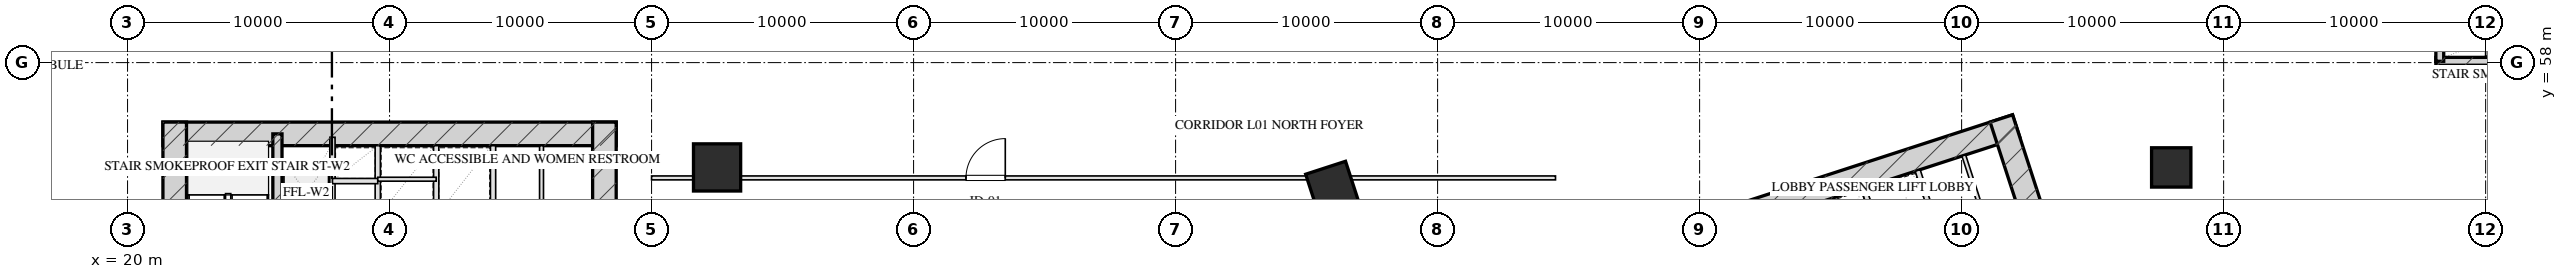
"""IFC4 building model, lengths in metres.
Left out: names, types, materials, properties, quantities, classifications, styles, units other than length and angle.
Written with IfcOpenShell. Run it as: python <this file> out.ifc"""

import sys

from ifc_helpers import new_model, si_unit, direction, frame, frame_2d, origin, origin_2d, place, context, subcontext, project, spatial, rectangle, hollow_rectangle, extrude, element, fill, save


model = new_model("IFC4")
c1 = context("Model", 3, precision=1e-05, world=origin(), true_north=direction((0.0, 1.0)))
c2 = subcontext(c1, "Body", "Model", "MODEL_VIEW")
j1 = project(units=[si_unit("LENGTHUNIT", "METRE"), si_unit("PLANEANGLEUNIT", "RADIAN")], contexts=[c1])
p1 = place(None, origin())
s1 = spatial("IfcSite", under=j1, at=p1, CompositionType="ELEMENT")
p2 = place(p1, origin())
s2 = spatial("IfcBuilding", under=s1, at=p2, CompositionType="ELEMENT")
p3 = place(p2, frame((0.0, 0.0, 6.0)))
s3 = spatial("IfcBuildingStorey", under=s2, at=p3, CompositionType="ELEMENT", Elevation=6.0)
p4 = place(p3, frame((21.35, 55.28, 0.0), z_axis=(0.0, 0.0, 1.0), x_axis=(1.0, 0.0, 0.0)))
e1 = element("IfcWall", 1, at=p4, inside=s3, PredefinedType="SHEAR", context=c2, shape_type="SweptSolid", body=[
    extrude(rectangle(XDim=17.3, YDim=0.9, at=frame_2d((8.65, 0.0))), origin(), (0.0, 0.0, 1.0), 5.5),
])
for number, where, z_axis, x_axis in (
    (2, (21.8, 45.95, 0.0), (0.0, 0.0, 1.0), (0.0, 1.0, 0.0)),
    (3, (38.2, 45.95, 0.0), (0.0, 0.0, 1.0), (0.0, 1.0, 0.0)),
):
    element("IfcWall", number, at=place(p3, frame(where, z_axis=z_axis, x_axis=x_axis)), inside=s3, PredefinedType="SHEAR", context=c2, shape_type="SweptSolid", body=[
        extrude(rectangle(XDim=9.78, YDim=0.9, at=frame_2d((4.89, 0.0))), origin(), (0.0, 0.0, 1.0), 5.5),
    ])
p5 = place(p3, frame((25.72, 48.3, 0.0), z_axis=(0.0, 0.0, 1.0), x_axis=(0.0, 1.0, 0.0)))
e4 = element("IfcWall", 4, at=p5, inside=s3, PredefinedType="SHEAR", context=c2, shape_type="SweptSolid", body=[
    extrude(rectangle(XDim=6.98, YDim=0.35, at=frame_2d((3.49, 0.0))), origin(), (0.0, 0.0, 1.0), 5.5),
])
p6 = place(p3, frame((76.201, 50.419, 0.0), z_axis=(0.0, 0.0, 1.0), x_axis=(0.951056412142, 0.309017314926, 0.0)))
e5 = element("IfcWall", 5, at=p6, inside=s3, PredefinedType="SHEAR", context=c2, shape_type="SweptSolid", body=[
    extrude(rectangle(XDim=16.7, YDim=0.9, at=frame_2d((8.35, 0.0))), origin(), (0.0, 0.0, 1.0), 5.5),
])
p7 = place(p3, frame((94.539, 46.568, 0.0), z_axis=(0.0, 0.0, 1.0), x_axis=(-0.309021722829, 0.951054979914, 0.0)))
e6 = element("IfcWall", 6, at=p7, inside=s3, PredefinedType="SHEAR", context=c2, shape_type="SweptSolid", body=[
    extrude(rectangle(XDim=9.78, YDim=0.9, at=frame_2d((4.89, 0.0))), origin(), (0.0, 0.0, 1.0), 5.5),
])
p8 = place(p3, frame((108.1, 58.05, 0.0), z_axis=(0.0, 0.0, 1.0), x_axis=(1.0, 0.0, 0.0)))
e7 = element("IfcWall", 7, at=p8, inside=s3, PredefinedType="SHEAR", context=c2, shape_type="SweptSolid", body=[
    extrude(rectangle(XDim=8.9, YDim=0.3, at=frame_2d((4.45, 0.0))), origin(), (0.0, 0.0, 1.0), 5.5),
])
p9 = place(p3, frame((108.25, 58.05, 0.0), z_axis=(0.0, 0.0, 1.0), x_axis=(0.0, 1.0, 0.0)))
e8 = element("IfcWall", 8, at=p9, inside=s3, PredefinedType="SHEAR", context=c2, shape_type="SweptSolid", body=[
    extrude(rectangle(XDim=3.4, YDim=0.3, at=frame_2d((1.7, 0.0))), origin(), (0.0, 0.0, 1.0), 5.5),
])
p10 = place(p9, frame((0.65, 0.0, 0.0)))
e9 = element("IfcOpeningElement", 9, at=p10, cuts=e8, PredefinedType="OPENING", context=c2, shape_type="SweptSolid", body=[
    extrude(rectangle(XDim=1.2, YDim=2.05, at=frame_2d((0.6, 1.025))), frame((0.0, 0.16, 0.0), z_axis=(0.0, -1.0, 0.0), x_axis=(1.0, 0.0, 0.0)), (0.0, 0.0, 1.0), 0.32),
])
p11 = place(p3, frame((42.5, 54.0, 0.0), z_axis=(0.0, 0.0, 1.0), x_axis=(1.0, 0.0, 0.0)))
e10 = element("IfcColumn", 10, at=p11, inside=s3, PredefinedType="COLUMN", context=c2, shape_type="SweptSolid", body=[
    extrude(hollow_rectangle(XDim=1.8, YDim=1.8, WallThickness=0.06, at=origin_2d()), origin(), (0.0, 0.0, 1.0), 5.501),
])
p12 = place(p3, frame((98.0, 54.0, 0.0), z_axis=(0.0, 0.0, 1.0), x_axis=(1.0, 0.0, 0.0)))
e11 = element("IfcColumn", 11, at=p12, inside=s3, PredefinedType="COLUMN", context=c2, shape_type="SweptSolid", body=[
    extrude(rectangle(XDim=1.5, YDim=1.5, at=origin_2d()), origin(), (0.0, 0.0, 1.0), 5.501),
])
p13 = place(p3, frame((65.973, 53.226, 0.0), z_axis=(0.0, 0.0, 1.0), x_axis=(0.951056516295, 0.309016994375, 0.0)))
e12 = element("IfcColumn", 12, at=p13, inside=s3, PredefinedType="COLUMN", context=c2, shape_type="SweptSolid", body=[
    extrude(hollow_rectangle(XDim=1.6, YDim=1.6, WallThickness=0.055, at=origin_2d()), origin(), (0.0, 0.0, 1.0), 5.501),
])
p14 = place(p3, frame((29.55, 46.4, 0.0), z_axis=(0.0, 0.0, 1.0), x_axis=(0.0, 1.0, 0.0)))
e13 = element("IfcWall", 13, at=p14, inside=s3, PredefinedType="PARTITIONING", context=c2, shape_type="SweptSolid", body=[
    extrude(rectangle(XDim=8.43, YDim=0.2, at=frame_2d((4.215, 0.0))), origin(), (0.0, 0.0, 1.0), 5.185),
])
p15 = place(p3, frame((27.82, 51.45, 0.0), z_axis=(0.0, 0.0, 1.0), x_axis=(0.0, 1.0, 0.0)))
e14 = element("IfcWall", 14, at=p15, inside=s3, PredefinedType="PARTITIONING", context=c2, shape_type="SweptSolid", body=[
    extrude(rectangle(XDim=3.7, YDim=0.2, at=frame_2d((1.85, 0.0))), origin(), (0.0, 0.0, 1.0), 5.185),
])
p16 = place(p3, frame((27.82, 53.48, 0.0), z_axis=(0.0, 0.0, 1.0), x_axis=(1.0, 0.0, 0.0)))
e15 = element("IfcWall", 15, at=p16, inside=s3, PredefinedType="PARTITIONING", context=c2, shape_type="SweptSolid", body=[
    extrude(rectangle(XDim=1.73, YDim=0.2, at=frame_2d((0.865, 0.0))), origin(), (0.0, 0.0, 1.0), 5.185),
])
p17 = place(p3, frame((33.95, 46.4, 0.0), z_axis=(0.0, 0.0, 1.0), x_axis=(0.0, 1.0, 0.0)))
e16 = element("IfcWall", 16, at=p17, inside=s3, PredefinedType="PARTITIONING", context=c2, shape_type="SweptSolid", body=[
    extrude(rectangle(XDim=8.43, YDim=0.2, at=frame_2d((4.215, 0.0))), origin(), (0.0, 0.0, 1.0), 5.185),
])
p18 = place(p3, frame((31.78, 49.72, 0.0), z_axis=(0.0, 0.0, 1.0), x_axis=(0.0, 1.0, 0.0)))
e17 = element("IfcWall", 17, at=p18, inside=s3, PredefinedType="PARTITIONING", context=c2, shape_type="SweptSolid", body=[
    extrude(rectangle(XDim=5.11, YDim=0.2, at=frame_2d((2.555, 0.0))), origin(), (0.0, 0.0, 1.0), 5.185),
])
p19 = place(p3, frame((29.55, 53.55, 0.0), z_axis=(0.0, 0.0, 1.0), x_axis=(1.0, 0.0, 0.0)))
e18 = element("IfcWall", 18, at=p19, inside=s3, PredefinedType="PARTITIONING", context=c2, shape_type="SweptSolid", body=[
    extrude(rectangle(XDim=2.23, YDim=0.15, at=frame_2d((1.115, 0.0))), origin(), (0.0, 0.0, 1.0), 5.185),
])
p20 = place(p3, frame((35.8, 49.1, 0.0), z_axis=(0.0, 0.0, 1.0), x_axis=(0.0, 1.0, 0.0)))
e19 = element("IfcWall", 19, at=p20, inside=s3, PredefinedType="PARTITIONING", context=c2, shape_type="SweptSolid", body=[
    extrude(rectangle(XDim=5.73, YDim=0.15, at=frame_2d((2.865, 0.0))), origin(), (0.0, 0.0, 1.0), 5.185),
])
p21 = place(p3, frame((90.928, 45.868, 0.0), z_axis=(0.0, 0.0, 1.0), x_axis=(-0.309042196757, 0.951048327176, 0.0)))
e20 = element("IfcWall", 20, at=p21, inside=s3, PredefinedType="PARTITIONING", context=c2, shape_type="SweptSolid", body=[
    extrude(rectangle(XDim=8.43, YDim=0.2, at=frame_2d((4.215, 0.0))), origin(), (0.0, 0.0, 1.0), 5.185),
])
p22 = place(p3, frame((87.838, 48.354, 0.0), z_axis=(0.0, 0.0, 1.0), x_axis=(-0.3090093719, 0.951058992953, 0.0)))
e21 = element("IfcWall", 21, at=p22, inside=s3, PredefinedType="PARTITIONING", context=c2, shape_type="SweptSolid", body=[
    extrude(rectangle(XDim=5.11, YDim=0.2, at=frame_2d((2.555, 0.0))), origin(), (0.0, 0.0, 1.0), 5.185),
])
p23 = place(p3, frame((91.853, 49.007, 0.0), z_axis=(0.0, 0.0, 1.0), x_axis=(-0.309022487551, 0.951054731437, 0.0)))
e22 = element("IfcWall", 22, at=p23, inside=s3, PredefinedType="PARTITIONING", context=c2, shape_type="SweptSolid", body=[
    extrude(rectangle(XDim=5.73, YDim=0.15, at=frame_2d((2.865, 0.0))), origin(), (0.0, 0.0, 1.0), 5.185),
])
p24 = place(p3, frame((40.0, 53.6, 0.0), z_axis=(0.0, 0.0, 1.0), x_axis=(1.0, 0.0, 0.0)))
e23 = element("IfcWall", 23, at=p24, inside=s3, PredefinedType="PARTITIONING", context=c2, shape_type="SweptSolid", body=[
    extrude(rectangle(XDim=34.5, YDim=0.15, at=frame_2d((17.25, 0.0))), origin(), (0.0, 0.0, 1.0), 5.185),
])
p25 = place(p24, frame((12.0, 0.0, 0.0)))
e24 = element("IfcOpeningElement", 24, at=p25, cuts=e23, PredefinedType="OPENING", context=c2, shape_type="SweptSolid", body=[
    extrude(rectangle(XDim=1.5, YDim=2.05, at=frame_2d((0.75, 1.025))), frame((0.0, 0.085, 0.0), z_axis=(0.0, -1.0, 0.0), x_axis=(1.0, 0.0, 0.0)), (0.0, 0.0, 1.0), 0.17),
])
p26 = place(p25, origin())
e25 = element("IfcDoor", 25, at=p26, inside=s3, OperationType="SINGLE_SWING_RIGHT", PredefinedType="DOOR", context=c2, shape_type="SweptSolid", body=[
    extrude(rectangle(XDim=1.5, YDim=2.05, at=frame_2d((0.75, 1.025))), frame((0.0, 0.025, 0.0), z_axis=(0.0, -1.0, 0.0), x_axis=(1.0, 0.0, 0.0)), (0.0, 0.0, 1.0), 0.05),
])
fill(e24, e25)
save(model, sys.argv[1])
